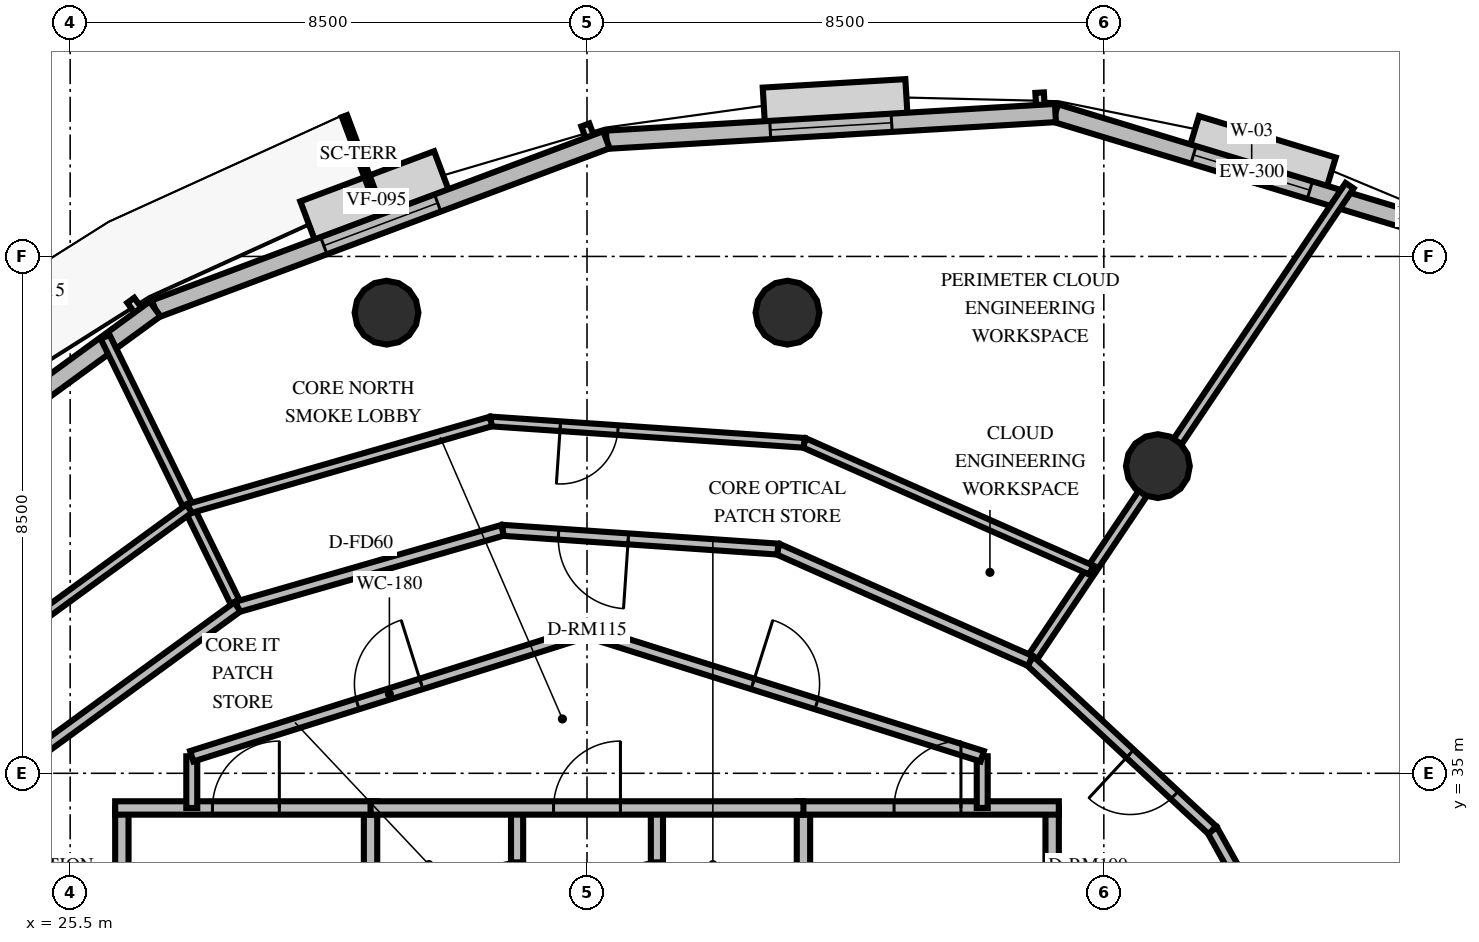
"""IFC4 building model, lengths in metres.
Left out: names, types, materials, properties, quantities, classifications, styles, units other than length and angle.
Written with IfcOpenShell. Run it as: python <this file> out.ifc"""

import sys

from ifc_helpers import new_model, si_unit, direction, frame, frame_2d, origin, origin_2d, place, context, subcontext, project, spatial, rectangle, circle, extrude, element, fill, save


model = new_model("IFC4")
c1 = context("Model", 3, precision=1e-05, world=origin(), true_north=direction((0.0, 1.0)))
c2 = subcontext(c1, "Body", "Model", "MODEL_VIEW")
j1 = project(units=[si_unit("LENGTHUNIT", "METRE"), si_unit("PLANEANGLEUNIT", "RADIAN")], contexts=[c1])
p1 = place(None, origin())
s1 = spatial("IfcSite", under=j1, at=p1, CompositionType="ELEMENT")
p2 = place(p1, origin())
s2 = spatial("IfcBuilding", under=s1, at=p2, CompositionType="ELEMENT")
p3 = place(p2, frame((0.0, 0.0, 184.4)))
s3 = spatial("IfcBuildingStorey", under=s2, at=p3, CompositionType="ELEMENT", Elevation=184.4)
for number, where, z_axis, x_axis in (
    (1, (43.389, 40.052, 0.0), (0.0, 0.0, 1.0), (1.0, 0.0, 0.0)),
    (2, (37.297, 42.575, 0.0), (0.0, 0.0, 1.0), (1.0, 0.0, 0.0)),
    (3, (30.703, 42.575, 0.0), (0.0, 0.0, 1.0), (1.0, 0.0, 0.0)),
):
    element("IfcColumn", number, at=place(p3, frame(where, z_axis=z_axis, x_axis=x_axis)), inside=s3, PredefinedType="COLUMN", context=c2, shape_type="SweptSolid", body=[
        extrude(circle(Radius=0.525, at=origin_2d()), origin(), (0.0, 0.0, 1.0), 3.6),
    ])
p4 = place(p3, frame((48.16, 43.902, 0.0), z_axis=(0.0, 0.0, 1.0), x_axis=(-0.957028666132, 0.289993331306, 0.0)))
e4 = element("IfcWall", 4, at=p4, inside=s3, PredefinedType="SOLIDWALL", context=c2, shape_type="SweptSolid", body=[
    extrude(rectangle(XDim=6.745, YDim=0.3, at=frame_2d((3.373, 0.0))), origin(), (0.0, 0.0, 1.0), 2.66),
])
p5 = place(p4, frame((2.373, 0.0, 0.8)))
e5 = element("IfcOpeningElement", 5, at=p5, cuts=e4, PredefinedType="OPENING", context=c2, shape_type="SweptSolid", body=[
    extrude(rectangle(XDim=2.0, YDim=1.85, at=frame_2d((1.0, 0.925))), frame((0.0, 0.16, 0.0), z_axis=(0.0, -1.0, 0.0), x_axis=(1.0, 0.0, 0.0)), (0.0, 0.0, 1.0), 0.32),
])
p6 = place(p3, frame((41.704, 45.858, 0.0), z_axis=(0.0, 0.0, 1.0), x_axis=(-0.998233967271, -0.059404937385, 0.0)))
e6 = element("IfcWall", 6, at=p6, inside=s3, PredefinedType="SOLIDWALL", context=c2, shape_type="SweptSolid", body=[
    extrude(rectangle(XDim=7.398, YDim=0.3, at=frame_2d((3.699, 0.0))), origin(), (0.0, 0.0, 1.0), 2.66),
])
p7 = place(p6, frame((2.699, 0.0, 0.8)))
e7 = element("IfcOpeningElement", 7, at=p7, cuts=e6, PredefinedType="OPENING", context=c2, shape_type="SweptSolid", body=[
    extrude(rectangle(XDim=2.0, YDim=1.85, at=frame_2d((1.0, 0.925))), frame((0.0, 0.16, 0.0), z_axis=(0.0, -1.0, 0.0), x_axis=(1.0, 0.0, 0.0)), (0.0, 0.0, 1.0), 0.32),
])
p8 = place(p3, frame((34.32, 45.419, 0.0), z_axis=(0.0, 0.0, 1.0), x_axis=(-0.93641901012, -0.350883794846, 0.0)))
e8 = element("IfcWall", 8, at=p8, inside=s3, PredefinedType="SOLIDWALL", context=c2, shape_type="SweptSolid", body=[
    extrude(rectangle(XDim=7.927, YDim=0.3, at=frame_2d((3.963, 0.0))), origin(), (0.0, 0.0, 1.0), 2.66),
])
p9 = place(p8, frame((2.964, 0.0, 0.8)))
e9 = element("IfcOpeningElement", 9, at=p9, cuts=e8, PredefinedType="OPENING", context=c2, shape_type="SweptSolid", body=[
    extrude(rectangle(XDim=2.0, YDim=1.85, at=frame_2d((1.0, 0.925))), frame((0.0, 0.16, 0.0), z_axis=(0.0, -1.0, 0.0), x_axis=(1.0, 0.0, 0.0)), (0.0, 0.0, 1.0), 0.32),
])
p10 = place(p3, frame((26.897, 42.637, 0.0), z_axis=(0.0, 0.0, 1.0), x_axis=(-0.807978032086, -0.589212609901, 0.0)))
e10 = element("IfcWall", 10, at=p10, inside=s3, PredefinedType="SOLIDWALL", context=c2, shape_type="SweptSolid", body=[
    extrude(rectangle(XDim=8.127, YDim=0.3, at=frame_2d((4.063, 0.0))), origin(), (0.0, 0.0, 1.0), 2.66),
])
p11 = place(p10, frame((6.27, 0.0, 0.0)))
e11 = element("IfcOpeningElement", 11, at=p11, cuts=e10, PredefinedType="OPENING", context=c2, shape_type="SweptSolid", body=[
    extrude(rectangle(XDim=1.05, YDim=2.15, at=frame_2d((0.525, 1.075))), frame((0.0, 0.16, 0.0), z_axis=(0.0, -1.0, 0.0), x_axis=(1.0, 0.0, 0.0)), (0.0, 0.0, 1.0), 0.32),
])
p12 = place(p3, frame((26.35, 30.05, 0.0), z_axis=(0.0, 0.0, 1.0), x_axis=(0.0, 1.0, 0.0)))
e12 = element("IfcWall", 12, at=p12, inside=s3, PredefinedType="SOLIDWALL", context=c2, shape_type="SweptSolid", body=[
    extrude(rectangle(XDim=4.38, YDim=0.22, at=frame_2d((2.19, 0.0))), origin(), (0.0, 0.0, 1.0), 2.46),
])
p13 = place(p3, frame((30.44, 30.05, 0.0), z_axis=(0.0, 0.0, 1.0), x_axis=(0.0, 1.0, 0.0)))
e13 = element("IfcWall", 13, at=p13, inside=s3, PredefinedType="SOLIDWALL", context=c2, shape_type="SweptSolid", body=[
    extrude(rectangle(XDim=4.38, YDim=0.22, at=frame_2d((2.19, 0.0))), origin(), (0.0, 0.0, 1.0), 2.46),
])
p14 = place(p13, frame((0.8, 0.0, 0.0)))
e14 = element("IfcOpeningElement", 14, at=p14, cuts=e13, PredefinedType="OPENING", context=c2, shape_type="SweptSolid", body=[
    extrude(rectangle(XDim=1.05, YDim=2.1, at=frame_2d((0.525, 1.05))), frame((0.0, 0.12, 0.0), z_axis=(0.0, -1.0, 0.0), x_axis=(1.0, 0.0, 0.0)), (0.0, 0.0, 1.0), 0.24),
])
p15 = place(p3, frame((26.24, 34.43, 0.0), z_axis=(0.0, 0.0, 1.0), x_axis=(1.0, 0.0, 0.0)))
e15 = element("IfcWall", 15, at=p15, inside=s3, PredefinedType="SOLIDWALL", context=c2, shape_type="SweptSolid", body=[
    extrude(rectangle(XDim=4.31, YDim=0.22, at=frame_2d((2.155, 0.0))), origin(), (0.0, 0.0, 1.0), 2.46),
])
p16 = place(p15, frame((1.6, 0.0, 0.0)))
e16 = element("IfcOpeningElement", 16, at=p16, cuts=e15, PredefinedType="OPENING", context=c2, shape_type="SweptSolid", body=[
    extrude(rectangle(XDim=1.1, YDim=2.15, at=frame_2d((0.55, 1.075))), frame((0.0, 0.12, 0.0), z_axis=(0.0, -1.0, 0.0), x_axis=(1.0, 0.0, 0.0)), (0.0, 0.0, 1.0), 0.24),
])
p17 = place(p3, frame((32.85, 30.05, 0.0), z_axis=(0.0, 0.0, 1.0), x_axis=(0.0, 1.0, 0.0)))
e17 = element("IfcWall", 17, at=p17, inside=s3, PredefinedType="SOLIDWALL", context=c2, shape_type="SweptSolid", body=[
    extrude(rectangle(XDim=4.38, YDim=0.2, at=frame_2d((2.19, 0.0))), origin(), (0.0, 0.0, 1.0), 2.46),
])
p18 = place(p17, frame((2.65, 0.0, 0.0)))
e18 = element("IfcOpeningElement", 18, at=p18, cuts=e17, PredefinedType="OPENING", context=c2, shape_type="SweptSolid", body=[
    extrude(rectangle(XDim=0.86, YDim=2.05, at=frame_2d((0.43, 1.025))), frame((0.0, 0.11, 0.0), z_axis=(0.0, -1.0, 0.0), x_axis=(1.0, 0.0, 0.0)), (0.0, 0.0, 1.0), 0.22),
])
p19 = place(p3, frame((37.56, 30.05, 0.0), z_axis=(0.0, 0.0, 1.0), x_axis=(0.0, 1.0, 0.0)))
e19 = element("IfcWall", 19, at=p19, inside=s3, PredefinedType="SOLIDWALL", context=c2, shape_type="SweptSolid", body=[
    extrude(rectangle(XDim=4.38, YDim=0.22, at=frame_2d((2.19, 0.0))), origin(), (0.0, 0.0, 1.0), 2.46),
])
p20 = place(p19, frame((0.8, 0.0, 0.0)))
e20 = element("IfcOpeningElement", 20, at=p20, cuts=e19, PredefinedType="OPENING", context=c2, shape_type="SweptSolid", body=[
    extrude(rectangle(XDim=1.05, YDim=2.1, at=frame_2d((0.525, 1.05))), frame((0.0, 0.12, 0.0), z_axis=(0.0, -1.0, 0.0), x_axis=(1.0, 0.0, 0.0)), (0.0, 0.0, 1.0), 0.24),
])
p21 = place(p3, frame((41.65, 30.05, 0.0), z_axis=(0.0, 0.0, 1.0), x_axis=(0.0, 1.0, 0.0)))
e21 = element("IfcWall", 21, at=p21, inside=s3, PredefinedType="SOLIDWALL", context=c2, shape_type="SweptSolid", body=[
    extrude(rectangle(XDim=4.38, YDim=0.22, at=frame_2d((2.19, 0.0))), origin(), (0.0, 0.0, 1.0), 2.46),
])
p22 = place(p3, frame((37.45, 34.43, 0.0), z_axis=(0.0, 0.0, 1.0), x_axis=(1.0, 0.0, 0.0)))
e22 = element("IfcWall", 22, at=p22, inside=s3, PredefinedType="SOLIDWALL", context=c2, shape_type="SweptSolid", body=[
    extrude(rectangle(XDim=4.31, YDim=0.22, at=frame_2d((2.155, 0.0))), origin(), (0.0, 0.0, 1.0), 2.46),
])
p23 = place(p22, frame((1.6, 0.0, 0.0)))
e23 = element("IfcOpeningElement", 23, at=p23, cuts=e22, PredefinedType="OPENING", context=c2, shape_type="SweptSolid", body=[
    extrude(rectangle(XDim=1.1, YDim=2.15, at=frame_2d((0.55, 1.075))), frame((0.0, 0.12, 0.0), z_axis=(0.0, -1.0, 0.0), x_axis=(1.0, 0.0, 0.0)), (0.0, 0.0, 1.0), 0.24),
])
p24 = place(p3, frame((35.15, 30.05, 0.0), z_axis=(0.0, 0.0, 1.0), x_axis=(0.0, 1.0, 0.0)))
e24 = element("IfcWall", 24, at=p24, inside=s3, PredefinedType="SOLIDWALL", context=c2, shape_type="SweptSolid", body=[
    extrude(rectangle(XDim=4.38, YDim=0.2, at=frame_2d((2.19, 0.0))), origin(), (0.0, 0.0, 1.0), 2.46),
])
p25 = place(p24, frame((2.65, 0.0, 0.0)))
e25 = element("IfcOpeningElement", 25, at=p25, cuts=e24, PredefinedType="OPENING", context=c2, shape_type="SweptSolid", body=[
    extrude(rectangle(XDim=0.86, YDim=2.05, at=frame_2d((0.43, 1.025))), frame((0.0, 0.11, 0.0), z_axis=(0.0, -1.0, 0.0), x_axis=(1.0, 0.0, 0.0)), (0.0, 0.0, 1.0), 0.22),
])
p26 = place(p3, frame((30.44, 34.43, 0.0), z_axis=(0.0, 0.0, 1.0), x_axis=(1.0, 0.0, 0.0)))
e26 = element("IfcWall", 26, at=p26, inside=s3, PredefinedType="SOLIDWALL", context=c2, shape_type="SweptSolid", body=[
    extrude(rectangle(XDim=7.12, YDim=0.22, at=frame_2d((3.56, 0.0))), origin(), (0.0, 0.0, 1.0), 2.46),
])
p27 = place(p26, frame((3.01, 0.0, 0.0)))
e27 = element("IfcOpeningElement", 27, at=p27, cuts=e26, PredefinedType="OPENING", context=c2, shape_type="SweptSolid", body=[
    extrude(rectangle(XDim=1.1, YDim=2.15, at=frame_2d((0.55, 1.075))), frame((0.0, 0.12, 0.0), z_axis=(0.0, -1.0, 0.0), x_axis=(1.0, 0.0, 0.0)), (0.0, 0.0, 1.0), 0.24),
])
for number, where, z_axis, x_axis in (
    (28, (27.5, 34.43, 0.0), (0.0, 0.0, 1.0), (0.0, 1.0, 0.0)),
    (29, (40.5, 35.28, 0.0), (0.0, 0.0, 1.0), (0.0, -1.0, 0.0)),
):
    element("IfcWall", number, at=place(p3, frame(where, z_axis=z_axis, x_axis=x_axis)), inside=s3, PredefinedType="PARTITIONING", context=c2, shape_type="SweptSolid", body=[
        extrude(rectangle(XDim=0.85, YDim=0.18, at=frame_2d((0.425, 0.0))), origin(), (0.0, 0.0, 1.0), 2.46),
    ])
p28 = place(p3, frame((27.5, 35.28, 0.0), z_axis=(0.0, 0.0, 1.0), x_axis=(0.953691418528, 0.300786765376, 0.0)))
e30 = element("IfcWall", 30, at=p28, inside=s3, PredefinedType="PARTITIONING", context=c2, shape_type="SweptSolid", body=[
    extrude(rectangle(XDim=6.816, YDim=0.18, at=frame_2d((3.408, 0.0))), origin(), (0.0, 0.0, 1.0), 2.46),
])
p29 = place(p28, frame((2.858, 0.0, 0.0)))
e31 = element("IfcOpeningElement", 31, at=p29, cuts=e30, PredefinedType="OPENING", context=c2, shape_type="SweptSolid", body=[
    extrude(rectangle(XDim=1.1, YDim=2.15, at=frame_2d((0.55, 1.075))), frame((0.0, 0.1, 0.0), z_axis=(0.0, -1.0, 0.0), x_axis=(1.0, 0.0, 0.0)), (0.0, 0.0, 1.0), 0.2),
])
p30 = place(p3, frame((34.0, 37.33, 0.0), z_axis=(0.0, 0.0, 1.0), x_axis=(0.953691418528, -0.300786765376, 0.0)))
e32 = element("IfcWall", 32, at=p30, inside=s3, PredefinedType="PARTITIONING", context=c2, shape_type="SweptSolid", body=[
    extrude(rectangle(XDim=6.816, YDim=0.18, at=frame_2d((3.408, 0.0))), origin(), (0.0, 0.0, 1.0), 2.46),
])
p31 = place(p30, frame((2.858, 0.0, 0.0)))
e33 = element("IfcOpeningElement", 33, at=p31, cuts=e32, PredefinedType="OPENING", context=c2, shape_type="SweptSolid", body=[
    extrude(rectangle(XDim=1.1, YDim=2.15, at=frame_2d((0.55, 1.075))), frame((0.0, 0.1, 0.0), z_axis=(0.0, -1.0, 0.0), x_axis=(1.0, 0.0, 0.0)), (0.0, 0.0, 1.0), 0.2),
])
p32 = place(p3, frame((41.29, 36.848, 0.0), z_axis=(0.0, 0.0, 1.0), x_axis=(0.557742049501, 0.830014340971, 0.0)))
e34 = element("IfcWall", 34, at=p32, inside=s3, PredefinedType="PARTITIONING", context=c2, shape_type="SweptSolid", body=[
    extrude(rectangle(XDim=9.416, YDim=0.16, at=frame_2d((4.708, 0.0))), origin(), (0.0, 0.0, 1.0), 2.46),
])
p33 = place(p3, frame((46.274, 30.492, 0.0), z_axis=(0.0, 0.0, 1.0), x_axis=(-0.486347391243, 0.873765537791, 0.0)))
e35 = element("IfcWall", 35, at=p33, inside=s3, PredefinedType="PARTITIONING", context=c2, shape_type="SweptSolid", body=[
    extrude(rectangle(XDim=4.089, YDim=0.18, at=frame_2d((2.044, 0.0))), origin(), (0.0, 0.0, 1.0), 2.46),
])
p34 = place(p3, frame((44.285, 34.065, 0.0), z_axis=(0.0, 0.0, 1.0), x_axis=(-0.73251486361, 0.680751037157, 0.0)))
e36 = element("IfcWall", 36, at=p34, inside=s3, PredefinedType="PARTITIONING", context=c2, shape_type="SweptSolid", body=[
    extrude(rectangle(XDim=4.089, YDim=0.18, at=frame_2d((2.044, 0.0))), origin(), (0.0, 0.0, 1.0), 2.46),
])
p35 = place(p34, frame((0.847, 0.0, 0.0)))
e37 = element("IfcOpeningElement", 37, at=p35, cuts=e36, PredefinedType="OPENING", context=c2, shape_type="SweptSolid", body=[
    extrude(rectangle(XDim=1.0, YDim=2.15, at=frame_2d((0.5, 1.075))), frame((0.0, 0.1, 0.0), z_axis=(0.0, -1.0, 0.0), x_axis=(1.0, 0.0, 0.0)), (0.0, 0.0, 1.0), 0.2),
])
p36 = place(p3, frame((28.25, 37.737, 0.0), z_axis=(0.0, 0.0, 1.0), x_axis=(-0.439928419605, 0.898032842175, 0.0)))
e38 = element("IfcWall", 38, at=p36, inside=s3, PredefinedType="PARTITIONING", context=c2, shape_type="SweptSolid", body=[
    extrude(rectangle(XDim=4.943, YDim=0.16, at=frame_2d((2.471, 0.0))), origin(), (0.0, 0.0, 1.0), 2.46),
])
p37 = place(p3, frame((41.29, 36.848, 0.0), z_axis=(0.0, 0.0, 1.0), x_axis=(-0.914263453777, 0.405120151421, 0.0)))
e39 = element("IfcWall", 39, at=p37, inside=s3, PredefinedType="PARTITIONING", context=c2, shape_type="SweptSolid", body=[
    extrude(rectangle(XDim=4.539, YDim=0.18, at=frame_2d((2.27, 0.0))), origin(), (0.0, 0.0, 1.0), 2.46),
])
p38 = place(p3, frame((37.14, 38.687, 0.0), z_axis=(0.0, 0.0, 1.0), x_axis=(-0.997682863043, 0.068036055081, 0.0)))
e40 = element("IfcWall", 40, at=p38, inside=s3, PredefinedType="PARTITIONING", context=c2, shape_type="SweptSolid", body=[
    extrude(rectangle(XDim=4.539, YDim=0.18, at=frame_2d((2.27, 0.0))), origin(), (0.0, 0.0, 1.0), 2.46),
])
p39 = place(p38, frame((2.467, 0.0, 0.0)))
e41 = element("IfcOpeningElement", 41, at=p39, cuts=e40, PredefinedType="OPENING", context=c2, shape_type="SweptSolid", body=[
    extrude(rectangle(XDim=1.15, YDim=2.15, at=frame_2d((0.575, 1.075))), frame((0.0, 0.1, 0.0), z_axis=(0.0, -1.0, 0.0), x_axis=(1.0, 0.0, 0.0)), (0.0, 0.0, 1.0), 0.2),
])
p40 = place(p3, frame((32.611, 38.996, 0.0), z_axis=(0.0, 0.0, 1.0), x_axis=(-0.960777578055, -0.27732011378, 0.0)))
e42 = element("IfcWall", 42, at=p40, inside=s3, PredefinedType="PARTITIONING", context=c2, shape_type="SweptSolid", body=[
    extrude(rectangle(XDim=4.539, YDim=0.18, at=frame_2d((2.27, 0.0))), origin(), (0.0, 0.0, 1.0), 2.46),
])
p41 = place(p3, frame((42.294, 38.342, 0.0), z_axis=(0.0, 0.0, 1.0), x_axis=(-0.914251594609, 0.405146913791, 0.0)))
e43 = element("IfcWall", 43, at=p41, inside=s3, PredefinedType="PARTITIONING", context=c2, shape_type="SweptSolid", body=[
    extrude(rectangle(XDim=5.164, YDim=0.16, at=frame_2d((2.582, 0.0))), origin(), (0.0, 0.0, 1.0), 2.46),
])
p42 = place(p3, frame((37.572, 40.435, 0.0), z_axis=(0.0, 0.0, 1.0), x_axis=(-0.997683401004, 0.068028165942, 0.0)))
e44 = element("IfcWall", 44, at=p42, inside=s3, PredefinedType="PARTITIONING", context=c2, shape_type="SweptSolid", body=[
    extrude(rectangle(XDim=5.164, YDim=0.16, at=frame_2d((2.582, 0.0))), origin(), (0.0, 0.0, 1.0), 2.46),
])
p43 = place(p42, frame((3.071, 0.0, 0.0)))
e45 = element("IfcOpeningElement", 45, at=p43, cuts=e44, PredefinedType="OPENING", context=c2, shape_type="SweptSolid", body=[
    extrude(rectangle(XDim=0.95, YDim=2.15, at=frame_2d((0.475, 1.075))), frame((0.0, 0.09, 0.0), z_axis=(0.0, -1.0, 0.0), x_axis=(1.0, 0.0, 0.0)), (0.0, 0.0, 1.0), 0.18),
])
p44 = place(p3, frame((32.42, 40.786, 0.0), z_axis=(0.0, 0.0, 1.0), x_axis=(-0.960781939833, -0.277305001922, 0.0)))
e46 = element("IfcWall", 46, at=p44, inside=s3, PredefinedType="PARTITIONING", context=c2, shape_type="SweptSolid", body=[
    extrude(rectangle(XDim=5.165, YDim=0.16, at=frame_2d((2.582, 0.0))), origin(), (0.0, 0.0, 1.0), 2.46),
])
p45 = place(p3, frame((28.25, 37.737, 0.0), z_axis=(0.0, 0.0, 1.0), x_axis=(-0.807970187932, -0.589223366316, 0.0)))
e47 = element("IfcWall", 47, at=p45, inside=s3, PredefinedType="PARTITIONING", context=c2, shape_type="SweptSolid", body=[
    extrude(rectangle(XDim=4.539, YDim=0.18, at=frame_2d((2.27, 0.0))), origin(), (0.0, 0.0, 1.0), 2.46),
])
p46 = place(p3, frame((27.458, 39.354, 0.0), z_axis=(0.0, 0.0, 1.0), x_axis=(-0.807966737534, -0.589228097632, 0.0)))
e48 = element("IfcWall", 48, at=p46, inside=s3, PredefinedType="PARTITIONING", context=c2, shape_type="SweptSolid", body=[
    extrude(rectangle(XDim=5.164, YDim=0.16, at=frame_2d((2.582, 0.0))), origin(), (0.0, 0.0, 1.0), 2.46),
])
p47 = place(p5, origin())
e49 = element("IfcWindow", 49, at=p47, inside=s3, PartitioningType="SINGLE_PANEL", PredefinedType="WINDOW", context=c2, shape_type="SweptSolid", body=[
    extrude(rectangle(XDim=2.0, YDim=1.85, at=frame_2d((1.0, 0.925))), frame((0.0, 0.03, 0.0), z_axis=(0.0, -1.0, 0.0), x_axis=(1.0, 0.0, 0.0)), (0.0, 0.0, 1.0), 0.06),
])
fill(e5, e49)
p48 = place(p7, origin())
e50 = element("IfcWindow", 50, at=p48, inside=s3, PartitioningType="SINGLE_PANEL", PredefinedType="WINDOW", context=c2, shape_type="SweptSolid", body=[
    extrude(rectangle(XDim=2.0, YDim=1.85, at=frame_2d((1.0, 0.925))), frame((0.0, 0.03, 0.0), z_axis=(0.0, -1.0, 0.0), x_axis=(1.0, 0.0, 0.0)), (0.0, 0.0, 1.0), 0.06),
])
fill(e7, e50)
p49 = place(p9, origin())
e51 = element("IfcWindow", 51, at=p49, inside=s3, PartitioningType="SINGLE_PANEL", PredefinedType="WINDOW", context=c2, shape_type="SweptSolid", body=[
    extrude(rectangle(XDim=2.0, YDim=1.85, at=frame_2d((1.0, 0.925))), frame((0.0, 0.03, 0.0), z_axis=(0.0, -1.0, 0.0), x_axis=(1.0, 0.0, 0.0)), (0.0, 0.0, 1.0), 0.06),
])
fill(e9, e51)
p50 = place(p16, origin())
e52 = element("IfcDoor", 52, at=p50, inside=s3, OperationType="SINGLE_SWING_RIGHT", PredefinedType="DOOR", context=c2, shape_type="SweptSolid", body=[
    extrude(rectangle(XDim=1.1, YDim=2.15, at=frame_2d((0.55, 1.075))), frame((0.0, 0.025, 0.0), z_axis=(0.0, -1.0, 0.0), x_axis=(1.0, 0.0, 0.0)), (0.0, 0.0, 1.0), 0.05),
])
fill(e16, e52)
p51 = place(p18, origin())
e53 = element("IfcDoor", 53, at=p51, inside=s3, OperationType="SINGLE_SWING_LEFT", PredefinedType="TRAPDOOR", context=c2, shape_type="SweptSolid", body=[
    extrude(rectangle(XDim=0.86, YDim=2.05, at=frame_2d((0.43, 1.025))), frame((0.0, 0.025, 0.0), z_axis=(0.0, -1.0, 0.0), x_axis=(1.0, 0.0, 0.0)), (0.0, 0.0, 1.0), 0.05),
])
fill(e18, e53)
p52 = place(p23, origin())
e54 = element("IfcDoor", 54, at=p52, inside=s3, OperationType="SINGLE_SWING_RIGHT", PredefinedType="DOOR", context=c2, shape_type="SweptSolid", body=[
    extrude(rectangle(XDim=1.1, YDim=2.15, at=frame_2d((0.55, 1.075))), frame((0.0, 0.025, 0.0), z_axis=(0.0, -1.0, 0.0), x_axis=(1.0, 0.0, 0.0)), (0.0, 0.0, 1.0), 0.05),
])
fill(e23, e54)
p53 = place(p25, origin())
e55 = element("IfcDoor", 55, at=p53, inside=s3, OperationType="SINGLE_SWING_LEFT", PredefinedType="TRAPDOOR", context=c2, shape_type="SweptSolid", body=[
    extrude(rectangle(XDim=0.86, YDim=2.05, at=frame_2d((0.43, 1.025))), frame((0.0, 0.025, 0.0), z_axis=(0.0, -1.0, 0.0), x_axis=(1.0, 0.0, 0.0)), (0.0, 0.0, 1.0), 0.05),
])
fill(e25, e55)
p54 = place(p27, origin())
e56 = element("IfcDoor", 56, at=p54, inside=s3, OperationType="SINGLE_SWING_RIGHT", PredefinedType="DOOR", context=c2, shape_type="SweptSolid", body=[
    extrude(rectangle(XDim=1.1, YDim=2.15, at=frame_2d((0.55, 1.075))), frame((0.0, 0.025, 0.0), z_axis=(0.0, -1.0, 0.0), x_axis=(1.0, 0.0, 0.0)), (0.0, 0.0, 1.0), 0.05),
])
fill(e27, e56)
p55 = place(p29, origin())
e57 = element("IfcDoor", 57, at=p55, inside=s3, OperationType="SINGLE_SWING_RIGHT", PredefinedType="DOOR", context=c2, shape_type="SweptSolid", body=[
    extrude(rectangle(XDim=1.1, YDim=2.15, at=frame_2d((0.55, 1.075))), frame((0.0, 0.025, 0.0), z_axis=(0.0, -1.0, 0.0), x_axis=(1.0, 0.0, 0.0)), (0.0, 0.0, 1.0), 0.05),
])
fill(e31, e57)
p56 = place(p31, origin())
e58 = element("IfcDoor", 58, at=p56, inside=s3, OperationType="SINGLE_SWING_LEFT", PredefinedType="DOOR", context=c2, shape_type="SweptSolid", body=[
    extrude(rectangle(XDim=1.1, YDim=2.15, at=frame_2d((0.55, 1.075))), frame((0.0, 0.025, 0.0), z_axis=(0.0, -1.0, 0.0), x_axis=(1.0, 0.0, 0.0)), (0.0, 0.0, 1.0), 0.05),
])
fill(e33, e58)
p57 = place(p35, origin())
e59 = element("IfcDoor", 59, at=p57, inside=s3, OperationType="SINGLE_SWING_RIGHT", PredefinedType="DOOR", context=c2, shape_type="SweptSolid", body=[
    extrude(rectangle(XDim=1.0, YDim=2.15, at=frame_2d((0.5, 1.075))), frame((0.0, 0.025, 0.0), z_axis=(0.0, -1.0, 0.0), x_axis=(1.0, 0.0, 0.0)), (0.0, 0.0, 1.0), 0.05),
])
fill(e37, e59)
p58 = place(p39, origin())
e60 = element("IfcDoor", 60, at=p58, inside=s3, OperationType="SINGLE_SWING_LEFT", PredefinedType="DOOR", context=c2, shape_type="SweptSolid", body=[
    extrude(rectangle(XDim=1.15, YDim=2.15, at=frame_2d((0.575, 1.075))), frame((0.0, 0.025, 0.0), z_axis=(0.0, -1.0, 0.0), x_axis=(1.0, 0.0, 0.0)), (0.0, 0.0, 1.0), 0.05),
])
fill(e41, e60)
p59 = place(p43, origin())
e61 = element("IfcDoor", 61, at=p59, inside=s3, OperationType="SINGLE_SWING_RIGHT", PredefinedType="DOOR", context=c2, shape_type="SweptSolid", body=[
    extrude(rectangle(XDim=0.95, YDim=2.15, at=frame_2d((0.475, 1.075))), frame((0.0, 0.025, 0.0), z_axis=(0.0, -1.0, 0.0), x_axis=(1.0, 0.0, 0.0)), (0.0, 0.0, 1.0), 0.05),
])
fill(e45, e61)
save(model, sys.argv[1])
